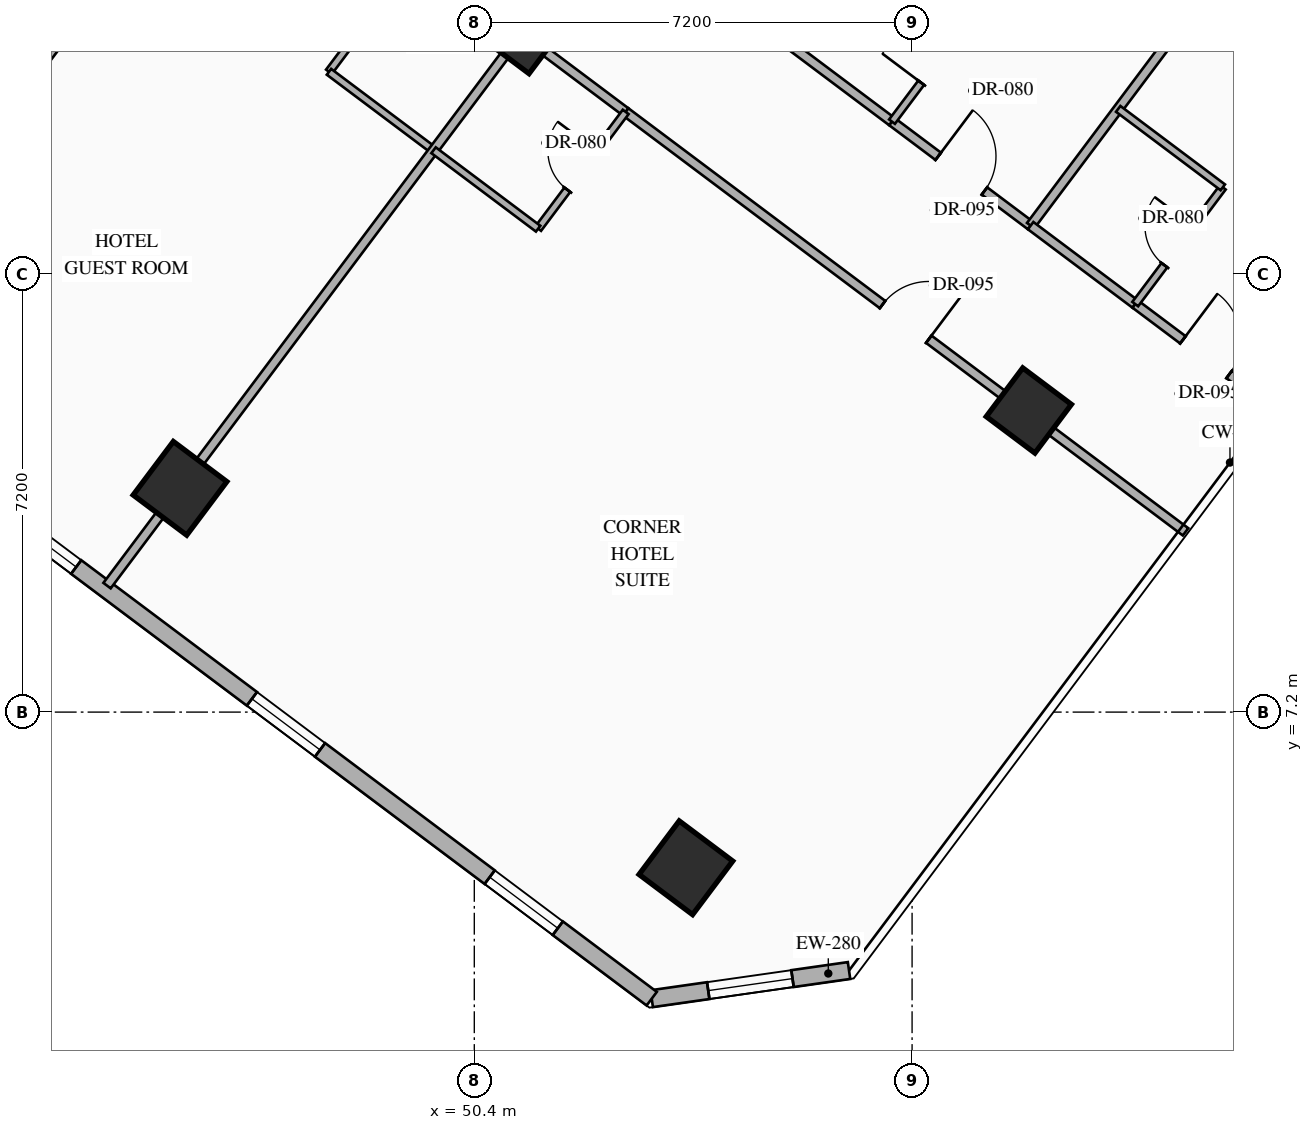
"""IFC4 building model, lengths in metres.
Left out: names, types, materials, properties, quantities, classifications, styles, units other than length and angle.
Written with IfcOpenShell. Run it as: python <this file> out.ifc"""

import sys

from ifc_helpers import new_model, si_unit, direction, frame, frame_2d, origin, origin_2d, place, context, subcontext, project, spatial, rectangle, hollow_rectangle, extrude, element, fill, save


model = new_model("IFC4")
c1 = context("Model", 3, precision=1e-05, world=origin(), true_north=direction((0.0, 1.0)))
c2 = subcontext(c1, "Body", "Model", "MODEL_VIEW")
j1 = project(units=[si_unit("LENGTHUNIT", "METRE"), si_unit("PLANEANGLEUNIT", "RADIAN")], contexts=[c1])
p1 = place(None, origin())
s1 = spatial("IfcSite", under=j1, at=p1, CompositionType="ELEMENT")
p2 = place(p1, origin())
s2 = spatial("IfcBuilding", under=s1, at=p2, CompositionType="ELEMENT")
p3 = place(p2, frame((0.0, 0.0, 43.3)))
s3 = spatial("IfcBuildingStorey", under=s2, at=p3, CompositionType="ELEMENT", Elevation=43.3)
p4 = place(p3, frame((45.56, 10.88, 0.0), z_axis=(0.0, 0.0, 1.0), x_axis=(0.799999996291, -0.600000004945, 0.0)))
e1 = element("IfcColumn", 1, at=p4, inside=s3, PredefinedType="COLUMN", context=c2, shape_type="SweptSolid", body=[
    extrude(hollow_rectangle(XDim=1.1, YDim=1.1, WallThickness=0.04, at=origin_2d()), origin(), (0.0, 0.0, 1.0), 3.35),
])
p5 = place(p3, frame((51.2, 18.4, 0.0), z_axis=(0.0, 0.0, 1.0), x_axis=(0.799999996291, -0.600000004945, 0.0)))
e2 = element("IfcColumn", 2, at=p5, inside=s3, PredefinedType="COLUMN", context=c2, shape_type="SweptSolid", body=[
    extrude(hollow_rectangle(XDim=1.0, YDim=1.0, WallThickness=0.038, at=origin_2d()), origin(), (0.0, 0.0, 1.0), 3.35),
])
p6 = place(p3, frame((53.88, 4.64, 0.0), z_axis=(0.0, 0.0, 1.0), x_axis=(0.799999996291, -0.600000004945, 0.0)))
e3 = element("IfcColumn", 3, at=p6, inside=s3, PredefinedType="COLUMN", context=c2, shape_type="SweptSolid", body=[
    extrude(hollow_rectangle(XDim=1.1, YDim=1.1, WallThickness=0.04, at=origin_2d()), origin(), (0.0, 0.0, 1.0), 3.35),
])
p7 = place(p3, frame((59.52, 12.16, 0.0), z_axis=(0.0, 0.0, 1.0), x_axis=(0.799999996291, -0.600000004945, 0.0)))
e4 = element("IfcColumn", 4, at=p7, inside=s3, PredefinedType="COLUMN", context=c2, shape_type="SweptSolid", body=[
    extrude(hollow_rectangle(XDim=1.0, YDim=1.0, WallThickness=0.038, at=origin_2d()), origin(), (0.0, 0.0, 1.0), 3.35),
])
p8 = place(p3, frame((56.563, 2.95, 0.0), z_axis=(0.0, 0.0, 1.0), x_axis=(-0.989977778067, -0.141223223777, 0.0)))
e5 = element("IfcWall", 5, at=p8, inside=s3, PredefinedType="STANDARD", context=c2, shape_type="SweptSolid", body=[
    extrude(rectangle(XDim=3.278, YDim=0.28, at=frame_2d((1.639, 0.0))), origin(), (0.0, 0.0, 1.0), 3.13),
])
p9 = place(p8, frame((0.939, 0.0, 0.85)))
e6 = element("IfcOpeningElement", 6, at=p9, cuts=e5, PredefinedType="OPENING", context=c2, shape_type="SweptSolid", body=[
    extrude(rectangle(XDim=1.4, YDim=1.8, at=frame_2d((0.7, 0.9))), frame((0.0, 0.15, 0.0), z_axis=(0.0, -1.0, 0.0), x_axis=(1.0, 0.0, 0.0)), (0.0, 0.0, 1.0), 0.3),
])
p10 = place(p3, frame((53.318, 2.487, 0.0), z_axis=(0.0, 0.0, 1.0), x_axis=(-0.800004174678, 0.599994433723, 0.0)))
e7 = element("IfcWall", 7, at=p10, inside=s3, PredefinedType="STANDARD", context=c2, shape_type="SweptSolid", body=[
    extrude(rectangle(XDim=35.089, YDim=0.28, at=frame_2d((17.544, 0.0))), origin(), (0.0, 0.0, 1.0), 3.13),
])
p11 = place(p10, frame((1.931, 0.0, 0.85)))
e8 = element("IfcOpeningElement", 8, at=p11, cuts=e7, PredefinedType="OPENING", context=c2, shape_type="SweptSolid", body=[
    extrude(rectangle(XDim=1.4, YDim=1.8, at=frame_2d((0.7, 0.9))), frame((0.0, 0.15, 0.0), z_axis=(0.0, -1.0, 0.0), x_axis=(1.0, 0.0, 0.0)), (0.0, 0.0, 1.0), 0.3),
])
p12 = place(p10, frame((6.819, 0.0, 0.85)))
e9 = element("IfcOpeningElement", 9, at=p12, cuts=e7, PredefinedType="OPENING", context=c2, shape_type="SweptSolid", body=[
    extrude(rectangle(XDim=1.4, YDim=1.8, at=frame_2d((0.7, 0.9))), frame((0.0, 0.15, 0.0), z_axis=(0.0, -1.0, 0.0), x_axis=(1.0, 0.0, 0.0)), (0.0, 0.0, 1.0), 0.3),
])
p13 = place(p10, frame((11.832, 0.0, 0.85)))
e10 = element("IfcOpeningElement", 10, at=p13, cuts=e7, PredefinedType="OPENING", context=c2, shape_type="SweptSolid", body=[
    extrude(rectangle(XDim=1.4, YDim=1.8, at=frame_2d((0.7, 0.9))), frame((0.0, 0.15, 0.0), z_axis=(0.0, -1.0, 0.0), x_axis=(1.0, 0.0, 0.0)), (0.0, 0.0, 1.0), 0.3),
])
p14 = place(p10, frame((17.647, 0.0, 0.85)))
e11 = element("IfcOpeningElement", 11, at=p14, cuts=e7, PredefinedType="OPENING", context=c2, shape_type="SweptSolid", body=[
    extrude(rectangle(XDim=1.4, YDim=1.8, at=frame_2d((0.7, 0.9))), frame((0.0, 0.15, 0.0), z_axis=(0.0, -1.0, 0.0), x_axis=(1.0, 0.0, 0.0)), (0.0, 0.0, 1.0), 0.3),
])
p15 = place(p10, frame((21.857, 0.0, 0.85)))
e12 = element("IfcOpeningElement", 12, at=p15, cuts=e7, PredefinedType="OPENING", context=c2, shape_type="SweptSolid", body=[
    extrude(rectangle(XDim=1.4, YDim=1.8, at=frame_2d((0.7, 0.9))), frame((0.0, 0.15, 0.0), z_axis=(0.0, -1.0, 0.0), x_axis=(1.0, 0.0, 0.0)), (0.0, 0.0, 1.0), 0.3),
])
p16 = place(p10, frame((26.87, 0.0, 0.85)))
e13 = element("IfcOpeningElement", 13, at=p16, cuts=e7, PredefinedType="OPENING", context=c2, shape_type="SweptSolid", body=[
    extrude(rectangle(XDim=1.4, YDim=1.8, at=frame_2d((0.7, 0.9))), frame((0.0, 0.15, 0.0), z_axis=(0.0, -1.0, 0.0), x_axis=(1.0, 0.0, 0.0)), (0.0, 0.0, 1.0), 0.3),
])
p17 = place(p10, frame((31.757, 0.0, 0.85)))
e14 = element("IfcOpeningElement", 14, at=p17, cuts=e7, PredefinedType="OPENING", context=c2, shape_type="SweptSolid", body=[
    extrude(rectangle(XDim=1.4, YDim=1.8, at=frame_2d((0.7, 0.9))), frame((0.0, 0.15, 0.0), z_axis=(0.0, -1.0, 0.0), x_axis=(1.0, 0.0, 0.0)), (0.0, 0.0, 1.0), 0.3),
])
p18 = place(p3, frame((39.464, 12.752, 0.0), z_axis=(0.0, 0.0, 1.0), x_axis=(0.6, 0.8, 0.0)))
e15 = element("IfcWall", 15, at=p18, inside=s3, PredefinedType="PARTITIONING", context=c2, shape_type="SweptSolid", body=[
    extrude(rectangle(XDim=11.51, YDim=0.15, at=frame_2d((5.755, 0.0))), origin(), (0.0, 0.0, 1.0), 3.13),
])
p19 = place(p3, frame((55.55, 18.2, 0.0), z_axis=(0.0, 0.0, 1.0), x_axis=(0.79998637334, -0.60001816845, 0.0)))
e16 = element("IfcWall", 16, at=p19, inside=s3, PredefinedType="PARTITIONING", context=c2, shape_type="SweptSolid", body=[
    extrude(rectangle(XDim=2.15, YDim=0.15, at=frame_2d((1.075, 0.0))), origin(), (0.0, 0.0, 1.0), 2.775),
])
p20 = place(p3, frame((57.27, 16.91, 0.0), z_axis=(0.0, 0.0, 1.0), x_axis=(0.800010279488, -0.599986293772, 0.0)))
e17 = element("IfcWall", 17, at=p20, inside=s3, PredefinedType="PARTITIONING", context=c2, shape_type="SweptSolid", body=[
    extrude(rectangle(XDim=2.85, YDim=0.15, at=frame_2d((1.425, 0.0))), origin(), (0.0, 0.0, 1.0), 2.775),
])
p21 = place(p20, frame((0.95, 0.0, 0.0)))
e18 = element("IfcOpeningElement", 18, at=p21, cuts=e17, PredefinedType="OPENING", context=c2, shape_type="SweptSolid", body=[
    extrude(rectangle(XDim=0.95, YDim=2.15, at=frame_2d((0.475, 1.075))), frame((0.0, 0.085, 0.0), z_axis=(0.0, -1.0, 0.0), x_axis=(1.0, 0.0, 0.0)), (0.0, 0.0, 1.0), 0.17),
])
p22 = place(p3, frame((57.27, 16.91, 0.0), z_axis=(0.0, 0.0, 1.0), x_axis=(0.599951172744, 0.800036618114, 0.0)))
e19 = element("IfcWall", 19, at=p22, inside=s3, PredefinedType="PARTITIONING", context=c2, shape_type="SweptSolid", body=[
    extrude(rectangle(XDim=2.4, YDim=0.12, at=frame_2d((1.2, 0.0))), origin(), (0.0, 0.0, 1.0), 3.13),
])
p23 = place(p22, frame((0.8, 0.0, 0.0)))
e20 = element("IfcOpeningElement", 20, at=p23, cuts=e19, PredefinedType="OPENING", context=c2, shape_type="SweptSolid", body=[
    extrude(rectangle(XDim=0.8, YDim=2.06, at=frame_2d((0.4, 1.03))), frame((0.0, 0.07, 0.0), z_axis=(0.0, -1.0, 0.0), x_axis=(1.0, 0.0, 0.0)), (0.0, 0.0, 1.0), 0.14),
])
p24 = place(p3, frame((59.55, 15.2, 0.0), z_axis=(0.0, 0.0, 1.0), x_axis=(0.599996617946, 0.80000253653, 0.0)))
e21 = element("IfcWall", 21, at=p24, inside=s3, PredefinedType="PARTITIONING", context=c2, shape_type="SweptSolid", body=[
    extrude(rectangle(XDim=11.55, YDim=0.15, at=frame_2d((5.775, 0.0))), origin(), (0.0, 0.0, 1.0), 3.13),
])
p25 = place(p3, frame((59.55, 15.2, 0.0), z_axis=(0.0, 0.0, 1.0), x_axis=(0.79998637334, -0.60001816845, 0.0)))
e22 = element("IfcWall", 22, at=p25, inside=s3, PredefinedType="PARTITIONING", context=c2, shape_type="SweptSolid", body=[
    extrude(rectangle(XDim=2.15, YDim=0.15, at=frame_2d((1.075, 0.0))), origin(), (0.0, 0.0, 1.0), 2.775),
])
p26 = place(p3, frame((61.27, 13.91, 0.0), z_axis=(0.0, 0.0, 1.0), x_axis=(0.800010068184, -0.59998657552, 0.0)))
e23 = element("IfcWall", 23, at=p26, inside=s3, PredefinedType="PARTITIONING", context=c2, shape_type="SweptSolid", body=[
    extrude(rectangle(XDim=2.91, YDim=0.15, at=frame_2d((1.455, 0.0))), origin(), (0.0, 0.0, 1.0), 3.13),
])
p27 = place(p26, frame((0.98, 0.0, 0.0)))
e24 = element("IfcOpeningElement", 24, at=p27, cuts=e23, PredefinedType="OPENING", context=c2, shape_type="SweptSolid", body=[
    extrude(rectangle(XDim=0.95, YDim=2.15, at=frame_2d((0.475, 1.075))), frame((0.0, 0.085, 0.0), z_axis=(0.0, -1.0, 0.0), x_axis=(1.0, 0.0, 0.0)), (0.0, 0.0, 1.0), 0.17),
])
p28 = place(p3, frame((61.27, 13.91, 0.0), z_axis=(0.0, 0.0, 1.0), x_axis=(0.599951172744, 0.800036618114, 0.0)))
e25 = element("IfcWall", 25, at=p28, inside=s3, PredefinedType="PARTITIONING", context=c2, shape_type="SweptSolid", body=[
    extrude(rectangle(XDim=2.4, YDim=0.12, at=frame_2d((1.2, 0.0))), origin(), (0.0, 0.0, 1.0), 3.13),
])
p29 = place(p28, frame((0.8, 0.0, 0.0)))
e26 = element("IfcOpeningElement", 26, at=p29, cuts=e25, PredefinedType="OPENING", context=c2, shape_type="SweptSolid", body=[
    extrude(rectangle(XDim=0.8, YDim=2.06, at=frame_2d((0.4, 1.03))), frame((0.0, 0.07, 0.0), z_axis=(0.0, -1.0, 0.0), x_axis=(1.0, 0.0, 0.0)), (0.0, 0.0, 1.0), 0.14),
])
p30 = place(p3, frame((60.99, 17.12, 0.0), z_axis=(0.0, 0.0, 1.0), x_axis=(0.79998637334, -0.60001816845, 0.0)))
e27 = element("IfcWall", 27, at=p30, inside=s3, PredefinedType="PARTITIONING", context=c2, shape_type="SweptSolid", body=[
    extrude(rectangle(XDim=2.15, YDim=0.12, at=frame_2d((1.075, 0.0))), origin(), (0.0, 0.0, 1.0), 3.13),
])
p31 = place(p3, frame((48.01, 17.73, 0.0), z_axis=(0.0, 0.0, 1.0), x_axis=(0.6, 0.8, 0.0)))
e28 = element("IfcWall", 28, at=p31, inside=s3, PredefinedType="PARTITIONING", context=c2, shape_type="SweptSolid", body=[
    extrude(rectangle(XDim=2.4, YDim=0.12, at=frame_2d((1.2, 0.0))), origin(), (0.0, 0.0, 1.0), 3.13),
])
p32 = place(p31, frame((0.8, 0.0, 0.0)))
e29 = element("IfcOpeningElement", 29, at=p32, cuts=e28, PredefinedType="OPENING", context=c2, shape_type="SweptSolid", body=[
    extrude(rectangle(XDim=0.8, YDim=2.06, at=frame_2d((0.4, 1.03))), frame((0.0, 0.07, 0.0), z_axis=(0.0, -1.0, 0.0), x_axis=(1.0, 0.0, 0.0)), (0.0, 0.0, 1.0), 0.14),
])
p33 = place(p3, frame((48.01, 17.73, 0.0), z_axis=(0.0, 0.0, 1.0), x_axis=(0.79998637334, -0.60001816845, 0.0)))
e30 = element("IfcWall", 30, at=p33, inside=s3, PredefinedType="PARTITIONING", context=c2, shape_type="SweptSolid", body=[
    extrude(rectangle(XDim=2.15, YDim=0.12, at=frame_2d((1.075, 0.0))), origin(), (0.0, 0.0, 1.0), 3.13),
])
p34 = place(p3, frame((44.36, 9.28, 0.0), z_axis=(0.0, 0.0, 1.0), x_axis=(0.599986233332, 0.800010324816, 0.0)))
e31 = element("IfcWall", 31, at=p34, inside=s3, PredefinedType="PARTITIONING", context=c2, shape_type="SweptSolid", body=[
    extrude(rectangle(XDim=11.35, YDim=0.15, at=frame_2d((5.675, 0.0))), origin(), (0.0, 0.0, 1.0), 2.425),
])
p35 = place(p3, frame((51.17, 18.36, 0.0), z_axis=(0.0, 0.0, 1.0), x_axis=(0.79998637334, -0.60001816845, 0.0)))
e32 = element("IfcWall", 32, at=p35, inside=s3, PredefinedType="PARTITIONING", context=c2, shape_type="SweptSolid", body=[
    extrude(rectangle(XDim=2.15, YDim=0.15, at=frame_2d((1.075, 0.0))), origin(), (0.0, 0.0, 1.0), 2.425),
])
p36 = place(p3, frame((52.89, 17.07, 0.0), z_axis=(0.0, 0.0, 1.0), x_axis=(0.8, -0.6, 0.0)))
e33 = element("IfcWall", 33, at=p36, inside=s3, PredefinedType="PARTITIONING", context=c2, shape_type="SweptSolid", body=[
    extrude(rectangle(XDim=11.51, YDim=0.15, at=frame_2d((5.755, 0.0))), origin(), (0.0, 0.0, 1.0), 2.425),
])
p37 = place(p36, frame((5.28, 0.0, 0.0)))
e34 = element("IfcOpeningElement", 34, at=p37, cuts=e33, PredefinedType="OPENING", context=c2, shape_type="SweptSolid", body=[
    extrude(rectangle(XDim=0.95, YDim=2.15, at=frame_2d((0.475, 1.075))), frame((0.0, 0.085, 0.0), z_axis=(0.0, -1.0, 0.0), x_axis=(1.0, 0.0, 0.0)), (0.0, 0.0, 1.0), 0.17),
])
p38 = place(p3, frame((51.45, 15.15, 0.0), z_axis=(0.0, 0.0, 1.0), x_axis=(0.599951172744, 0.800036618114, 0.0)))
e35 = element("IfcWall", 35, at=p38, inside=s3, PredefinedType="PARTITIONING", context=c2, shape_type="SweptSolid", body=[
    extrude(rectangle(XDim=2.4, YDim=0.12, at=frame_2d((1.2, 0.0))), origin(), (0.0, 0.0, 1.0), 3.13),
])
p39 = place(p38, frame((0.8, 0.0, 0.0)))
e36 = element("IfcOpeningElement", 36, at=p39, cuts=e35, PredefinedType="OPENING", context=c2, shape_type="SweptSolid", body=[
    extrude(rectangle(XDim=0.8, YDim=2.06, at=frame_2d((0.4, 1.03))), frame((0.0, 0.07, 0.0), z_axis=(0.0, -1.0, 0.0), x_axis=(1.0, 0.0, 0.0)), (0.0, 0.0, 1.0), 0.14),
])
p40 = place(p3, frame((49.73, 16.44, 0.0), z_axis=(0.0, 0.0, 1.0), x_axis=(0.79998637334, -0.60001816845, 0.0)))
e37 = element("IfcWall", 37, at=p40, inside=s3, PredefinedType="PARTITIONING", context=c2, shape_type="SweptSolid", body=[
    extrude(rectangle(XDim=2.15, YDim=0.12, at=frame_2d((1.075, 0.0))), origin(), (0.0, 0.0, 1.0), 3.13),
])
p41 = place(p9, origin())
e38 = element("IfcWindow", 38, at=p41, inside=s3, PartitioningType="SINGLE_PANEL", PredefinedType="WINDOW", context=c2, shape_type="SweptSolid", body=[
    extrude(rectangle(XDim=1.4, YDim=1.8, at=frame_2d((0.7, 0.9))), frame((0.0, 0.03, 0.0), z_axis=(0.0, -1.0, 0.0), x_axis=(1.0, 0.0, 0.0)), (0.0, 0.0, 1.0), 0.06),
])
fill(e6, e38)
p42 = place(p11, origin())
e39 = element("IfcWindow", 39, at=p42, inside=s3, PartitioningType="SINGLE_PANEL", PredefinedType="WINDOW", context=c2, shape_type="SweptSolid", body=[
    extrude(rectangle(XDim=1.4, YDim=1.8, at=frame_2d((0.7, 0.9))), frame((0.0, 0.03, 0.0), z_axis=(0.0, -1.0, 0.0), x_axis=(1.0, 0.0, 0.0)), (0.0, 0.0, 1.0), 0.06),
])
fill(e8, e39)
p43 = place(p12, origin())
e40 = element("IfcWindow", 40, at=p43, inside=s3, PartitioningType="SINGLE_PANEL", PredefinedType="WINDOW", context=c2, shape_type="SweptSolid", body=[
    extrude(rectangle(XDim=1.4, YDim=1.8, at=frame_2d((0.7, 0.9))), frame((0.0, 0.03, 0.0), z_axis=(0.0, -1.0, 0.0), x_axis=(1.0, 0.0, 0.0)), (0.0, 0.0, 1.0), 0.06),
])
fill(e9, e40)
p44 = place(p13, origin())
e41 = element("IfcWindow", 41, at=p44, inside=s3, PartitioningType="SINGLE_PANEL", PredefinedType="WINDOW", context=c2, shape_type="SweptSolid", body=[
    extrude(rectangle(XDim=1.4, YDim=1.8, at=frame_2d((0.7, 0.9))), frame((0.0, 0.03, 0.0), z_axis=(0.0, -1.0, 0.0), x_axis=(1.0, 0.0, 0.0)), (0.0, 0.0, 1.0), 0.06),
])
fill(e10, e41)
p45 = place(p21, origin())
e42 = element("IfcDoor", 42, at=p45, inside=s3, OperationType="SINGLE_SWING_LEFT", PredefinedType="DOOR", context=c2, shape_type="SweptSolid", body=[
    extrude(rectangle(XDim=0.95, YDim=2.15, at=frame_2d((0.475, 1.075))), frame((0.0, 0.025, 0.0), z_axis=(0.0, -1.0, 0.0), x_axis=(1.0, 0.0, 0.0)), (0.0, 0.0, 1.0), 0.05),
])
fill(e18, e42)
p46 = place(p23, origin())
e43 = element("IfcDoor", 43, at=p46, inside=s3, OperationType="SINGLE_SWING_LEFT", PredefinedType="DOOR", context=c2, shape_type="SweptSolid", body=[
    extrude(rectangle(XDim=0.8, YDim=2.06, at=frame_2d((0.4, 1.03))), frame((0.0, 0.025, 0.0), z_axis=(0.0, -1.0, 0.0), x_axis=(1.0, 0.0, 0.0)), (0.0, 0.0, 1.0), 0.05),
])
fill(e20, e43)
p47 = place(p27, origin())
e44 = element("IfcDoor", 44, at=p47, inside=s3, OperationType="SINGLE_SWING_LEFT", PredefinedType="DOOR", context=c2, shape_type="SweptSolid", body=[
    extrude(rectangle(XDim=0.95, YDim=2.15, at=frame_2d((0.475, 1.075))), frame((0.0, 0.025, 0.0), z_axis=(0.0, -1.0, 0.0), x_axis=(1.0, 0.0, 0.0)), (0.0, 0.0, 1.0), 0.05),
])
fill(e24, e44)
p48 = place(p29, origin())
e45 = element("IfcDoor", 45, at=p48, inside=s3, OperationType="SINGLE_SWING_RIGHT", PredefinedType="DOOR", context=c2, shape_type="SweptSolid", body=[
    extrude(rectangle(XDim=0.8, YDim=2.06, at=frame_2d((0.4, 1.03))), frame((0.0, 0.025, 0.0), z_axis=(0.0, -1.0, 0.0), x_axis=(1.0, 0.0, 0.0)), (0.0, 0.0, 1.0), 0.05),
])
fill(e26, e45)
p49 = place(p37, origin())
e46 = element("IfcDoor", 46, at=p49, inside=s3, OperationType="SINGLE_SWING_RIGHT", PredefinedType="DOOR", context=c2, shape_type="SweptSolid", body=[
    extrude(rectangle(XDim=0.95, YDim=2.15, at=frame_2d((0.475, 1.075))), frame((0.0, 0.025, 0.0), z_axis=(0.0, -1.0, 0.0), x_axis=(1.0, 0.0, 0.0)), (0.0, 0.0, 1.0), 0.05),
])
fill(e34, e46)
p50 = place(p39, origin())
e47 = element("IfcDoor", 47, at=p50, inside=s3, OperationType="SINGLE_SWING_RIGHT", PredefinedType="DOOR", context=c2, shape_type="SweptSolid", body=[
    extrude(rectangle(XDim=0.8, YDim=2.06, at=frame_2d((0.4, 1.03))), frame((0.0, 0.025, 0.0), z_axis=(0.0, -1.0, 0.0), x_axis=(1.0, 0.0, 0.0)), (0.0, 0.0, 1.0), 0.05),
])
fill(e36, e47)
save(model, sys.argv[1])
